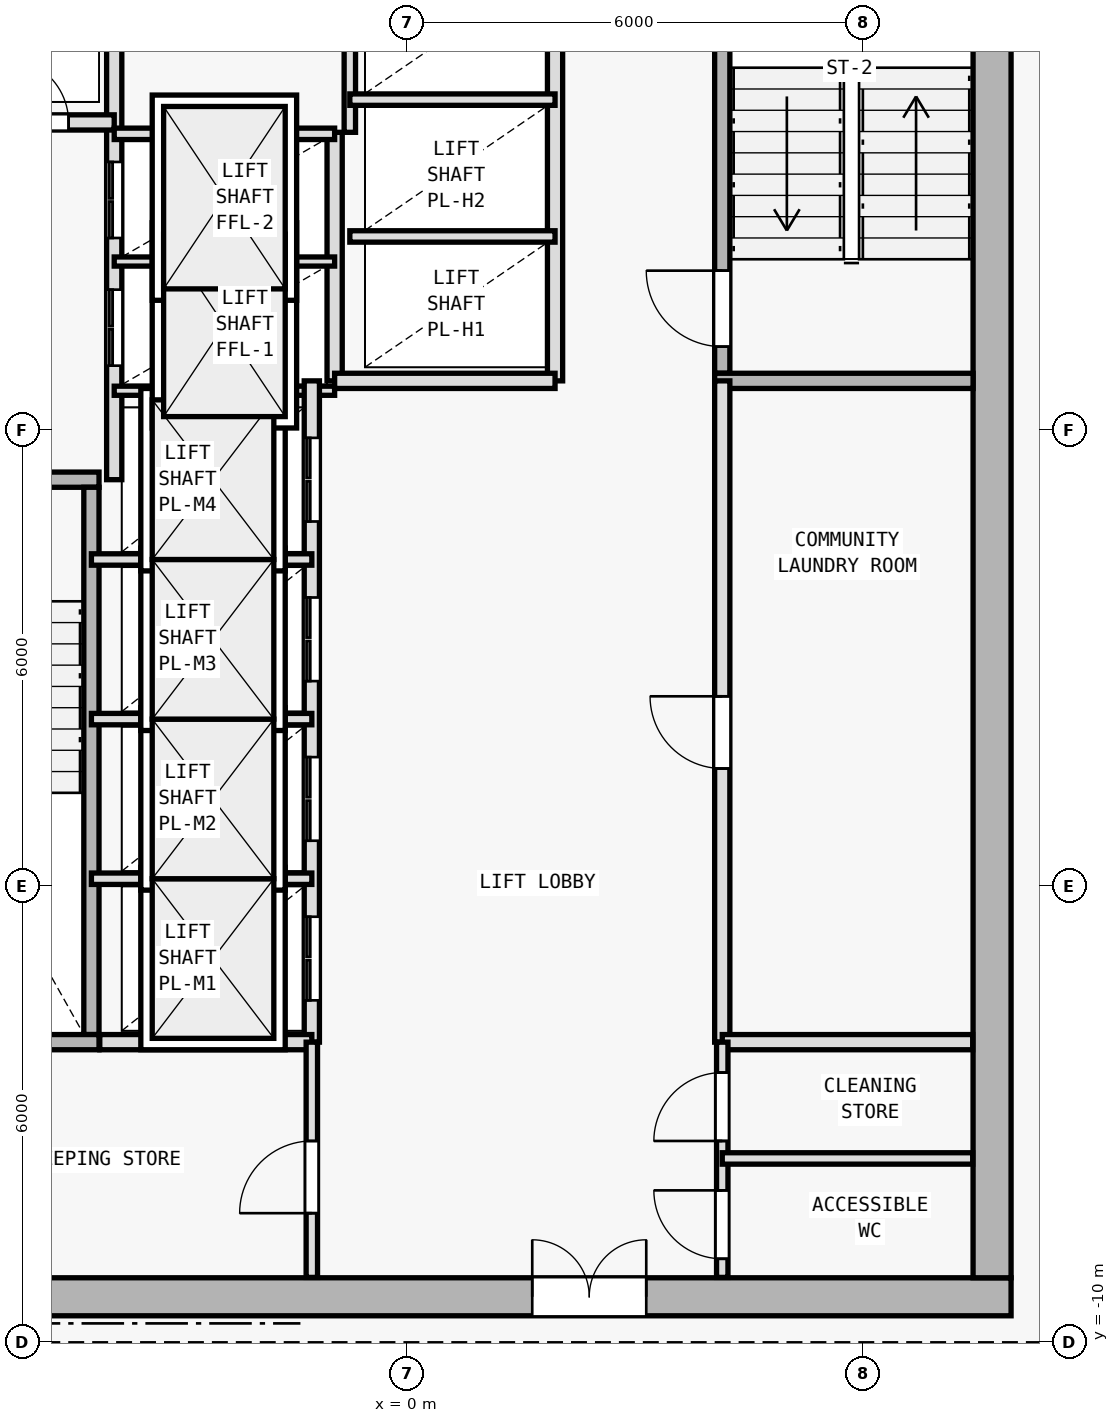
"""IFC4 building model, lengths in metres.
Left out: names, types, materials, properties, quantities, classifications, styles, units other than length and angle.
Written with IfcOpenShell. Run it as: python <this file> out.ifc"""

import sys

from ifc_helpers import new_model, si_unit, direction, frame, frame_2d, origin, origin_2d, place, context, subcontext, project, spatial, rectangle, i_section, extrude, element, fill, save


model = new_model("IFC4")
c1 = context("Model", 3, precision=1e-05, world=origin(), true_north=direction((0.0, 1.0)))
c2 = subcontext(c1, "Body", "Model", "MODEL_VIEW")
j1 = project(units=[si_unit("LENGTHUNIT", "METRE"), si_unit("PLANEANGLEUNIT", "RADIAN")], contexts=[c1])
p1 = place(None, origin())
s1 = spatial("IfcSite", under=j1, at=p1, CompositionType="ELEMENT")
p2 = place(p1, origin())
s2 = spatial("IfcBuilding", under=s1, at=p2, CompositionType="ELEMENT")
p3 = place(p2, frame((0.0, 0.0, 142.2)))
s3 = spatial("IfcBuildingStorey", under=s2, at=p3, CompositionType="ELEMENT", Elevation=142.2)
for number, where, z_axis, x_axis in (
    (1, (7.7, -9.4, 0.0), (0.0, 0.0, 1.0), (1.0, 0.0, 0.0)),
    (2, (0.0, -9.4, 0.0), (0.0, 0.0, 1.0), (1.0, 0.0, 0.0)),
    (3, (7.7, 0.4, 0.0), (0.0, 0.0, 1.0), (1.0, 0.0, 0.0)),
):
    element("IfcColumn", number, at=place(p3, frame(where, z_axis=z_axis, x_axis=x_axis)), inside=s3, PredefinedType="COLUMN", context=c2, shape_type="SweptSolid", body=[
        extrude(i_section(OverallWidth=0.404, OverallDepth=0.407, WebThickness=0.017, FlangeThickness=0.028, FilletRadius=0.015, at=origin_2d()), origin(), (0.0, 0.0, 1.0), 3.6),
    ])
p4 = place(p3, frame((-7.95, -9.4, 0.0), z_axis=(0.0, 0.0, 1.0), x_axis=(1.0, 0.0, 0.0)))
e4 = element("IfcWall", 4, at=p4, inside=s3, PredefinedType="SHEAR", context=c2, shape_type="SweptSolid", body=[
    extrude(rectangle(XDim=15.9, YDim=0.5, at=frame_2d((7.95, 0.0))), origin(), (0.0, 0.0, 1.0), 3.35),
])
p5 = place(p4, frame((9.6, 0.0, 0.0)))
e5 = element("IfcOpeningElement", 5, at=p5, cuts=e4, PredefinedType="OPENING", context=c2, shape_type="SweptSolid", body=[
    extrude(rectangle(XDim=1.5, YDim=2.2, at=frame_2d((0.75, 1.1))), frame((0.0, 0.26, 0.0), z_axis=(0.0, -1.0, 0.0), x_axis=(1.0, 0.0, 0.0)), (0.0, 0.0, 1.0), 0.52),
])
p6 = place(p3, frame((7.7, 9.95, 0.0), z_axis=(0.0, 0.0, 1.0), x_axis=(0.0, -1.0, 0.0)))
e6 = element("IfcWall", 6, at=p6, inside=s3, PredefinedType="SHEAR", context=c2, shape_type="SweptSolid", body=[
    extrude(rectangle(XDim=19.1, YDim=0.5, at=frame_2d((9.55, 0.0))), origin(), (0.0, 0.0, 1.0), 3.35),
])
p7 = place(p3, frame((-7.45, 1.35, 0.0), z_axis=(0.0, 0.0, 1.0), x_axis=(1.0, 0.0, 0.0)))
e7 = element("IfcWall", 7, at=p7, inside=s3, PredefinedType="SOLIDWALL", context=c2, shape_type="SweptSolid", body=[
    extrude(rectangle(XDim=3.4, YDim=0.2, at=frame_2d((1.7, 0.0))), origin(), (0.0, 0.0, 1.0), 3.35),
])
p8 = place(p7, frame((0.65, 0.0, 0.0)))
e8 = element("IfcOpeningElement", 8, at=p8, cuts=e7, PredefinedType="OPENING", context=c2, shape_type="SweptSolid", body=[
    extrude(rectangle(XDim=1.0, YDim=2.15, at=frame_2d((0.5, 1.075))), frame((0.0, 0.11, 0.0), z_axis=(0.0, -1.0, 0.0), x_axis=(1.0, 0.0, 0.0)), (0.0, 0.0, 1.0), 0.22),
])
p9 = place(p3, frame((-4.15, -5.95, 0.0), z_axis=(0.0, 0.0, 1.0), x_axis=(0.0, 1.0, 0.0)))
e9 = element("IfcWall", 9, at=p9, inside=s3, PredefinedType="SOLIDWALL", context=c2, shape_type="SweptSolid", body=[
    extrude(rectangle(XDim=7.2, YDim=0.2, at=frame_2d((3.6, 0.0))), origin(), (0.0, 0.0, 1.0), 3.35),
])
p10 = place(p3, frame((-3.85, 1.35, 0.0), z_axis=(0.0, 0.0, 1.0), x_axis=(0.0, 1.0, 0.0)))
e10 = element("IfcWall", 10, at=p10, inside=s3, PredefinedType="SOLIDWALL", context=c2, shape_type="SweptSolid", body=[
    extrude(rectangle(XDim=8.595, YDim=0.2, at=frame_2d((4.297, 0.0))), origin(), (0.0, 0.0, 1.0), 3.35),
])
p11 = place(p10, frame((1.5, 0.0, 0.0)))
e11 = element("IfcOpeningElement", 11, at=p11, cuts=e10, PredefinedType="OPENING", context=c2, shape_type="SweptSolid", body=[
    extrude(rectangle(XDim=1.0, YDim=2.15, at=frame_2d((0.5, 1.075))), frame((0.0, 0.11, 0.0), z_axis=(0.0, -1.0, 0.0), x_axis=(1.0, 0.0, 0.0)), (0.0, 0.0, 1.0), 0.22),
])
p12 = place(p10, frame((3.18, 0.0, 0.0)))
e12 = element("IfcOpeningElement", 12, at=p12, cuts=e10, PredefinedType="OPENING", context=c2, shape_type="SweptSolid", body=[
    extrude(rectangle(XDim=1.0, YDim=2.15, at=frame_2d((0.5, 1.075))), frame((0.0, 0.11, 0.0), z_axis=(0.0, -1.0, 0.0), x_axis=(1.0, 0.0, 0.0)), (0.0, 0.0, 1.0), 0.22),
])
p13 = place(p3, frame((-7.445, 6.05, 0.0), z_axis=(0.0, 0.0, 1.0), x_axis=(1.0, 0.0, 0.0)))
e13 = element("IfcWall", 13, at=p13, inside=s3, PredefinedType="SOLIDWALL", context=c2, shape_type="SweptSolid", body=[
    extrude(rectangle(XDim=3.595, YDim=0.2, at=frame_2d((1.797, 0.0))), origin(), (0.0, 0.0, 1.0), 3.35),
])
p14 = place(p13, frame((0.345, 0.0, 0.0)))
e14 = element("IfcOpeningElement", 14, at=p14, cuts=e13, PredefinedType="OPENING", context=c2, shape_type="SweptSolid", body=[
    extrude(rectangle(XDim=0.85, YDim=2.1, at=frame_2d((0.425, 1.05))), frame((0.0, 0.11, 0.0), z_axis=(0.0, -1.0, 0.0), x_axis=(1.0, 0.0, 0.0)), (0.0, 0.0, 1.0), 0.22),
])
p15 = place(p13, frame((2.145, 0.0, 0.0)))
e15 = element("IfcOpeningElement", 15, at=p15, cuts=e13, PredefinedType="OPENING", context=c2, shape_type="SweptSolid", body=[
    extrude(rectangle(XDim=0.85, YDim=2.1, at=frame_2d((0.425, 1.05))), frame((0.0, 0.11, 0.0), z_axis=(0.0, -1.0, 0.0), x_axis=(1.0, 0.0, 0.0)), (0.0, 0.0, 1.0), 0.22),
])
p16 = place(p3, frame((4.15, 2.75, 0.0), z_axis=(0.0, 0.0, 1.0), x_axis=(0.0, 1.0, 0.0)))
e16 = element("IfcWall", 16, at=p16, inside=s3, PredefinedType="SOLIDWALL", context=c2, shape_type="SweptSolid", body=[
    extrude(rectangle(XDim=7.2, YDim=0.2, at=frame_2d((3.6, 0.0))), origin(), (0.0, 0.0, 1.0), 3.35),
])
p17 = place(p16, frame((0.35, 0.0, 0.0)))
e17 = element("IfcOpeningElement", 17, at=p17, cuts=e16, PredefinedType="OPENING", context=c2, shape_type="SweptSolid", body=[
    extrude(rectangle(XDim=1.0, YDim=2.15, at=frame_2d((0.5, 1.075))), frame((0.0, 0.11, 0.0), z_axis=(0.0, -1.0, 0.0), x_axis=(1.0, 0.0, 0.0)), (0.0, 0.0, 1.0), 0.22),
])
p18 = place(p3, frame((4.05, 2.65, 0.0), z_axis=(0.0, 0.0, 1.0), x_axis=(1.0, 0.0, 0.0)))
e18 = element("IfcWall", 18, at=p18, inside=s3, PredefinedType="SOLIDWALL", context=c2, shape_type="SweptSolid", body=[
    extrude(rectangle(XDim=3.4, YDim=0.2, at=frame_2d((1.7, 0.0))), origin(), (0.0, 0.0, 1.0), 3.35),
])
p19 = place(p3, frame((-0.95, 2.65, 0.0), z_axis=(0.0, 0.0, 1.0), x_axis=(0.0, 1.0, 0.0)))
e19 = element("IfcWall", 19, at=p19, inside=s3, PredefinedType="SOLIDWALL", context=c2, shape_type="SweptSolid", body=[
    extrude(rectangle(XDim=3.27, YDim=0.2, at=frame_2d((1.635, 0.0))), origin(), (0.0, 0.0, 1.0), 3.35),
])
for number, where, z_axis, x_axis in (
    (20, (-3.85, 2.52, 0.0), (0.0, 0.0, 1.0), (1.0, 0.0, 0.0)),
    (21, (-3.85, 4.22, 0.0), (0.0, 0.0, 1.0), (1.0, 0.0, 0.0)),
):
    element("IfcWall", number, at=place(p3, frame(where, z_axis=z_axis, x_axis=x_axis)), inside=s3, PredefinedType="PARTITIONING", context=c2, shape_type="SweptSolid", body=[
        extrude(rectangle(XDim=2.9, YDim=0.12, at=frame_2d((1.45, 0.0))), origin(), (0.0, 0.0, 1.0), 3.35),
    ])
p20 = place(p3, frame((-3.85, 5.9, 0.0), z_axis=(0.0, 0.0, 1.0), x_axis=(1.0, 0.0, 0.0)))
e22 = element("IfcWall", 22, at=p20, inside=s3, PredefinedType="PARTITIONING", context=c2, shape_type="SweptSolid", body=[
    extrude(rectangle(XDim=2.9, YDim=0.15, at=frame_2d((1.45, 0.0))), origin(), (0.0, 0.0, 1.0), 3.35),
])
p21 = place(p3, frame((4.15, -6.05, 0.0), z_axis=(0.0, 0.0, 1.0), x_axis=(0.0, 1.0, 0.0)))
e23 = element("IfcWall", 23, at=p21, inside=s3, PredefinedType="SOLIDWALL", context=c2, shape_type="SweptSolid", body=[
    extrude(rectangle(XDim=8.7, YDim=0.2, at=frame_2d((4.35, 0.0))), origin(), (0.0, 0.0, 1.0), 3.35),
])
p22 = place(p21, frame((3.6, 0.0, 0.0)))
e24 = element("IfcOpeningElement", 24, at=p22, cuts=e23, PredefinedType="OPENING", context=c2, shape_type="SweptSolid", body=[
    extrude(rectangle(XDim=0.95, YDim=2.1, at=frame_2d((0.475, 1.05))), frame((0.0, 0.11, 0.0), z_axis=(0.0, -1.0, 0.0), x_axis=(1.0, 0.0, 0.0)), (0.0, 0.0, 1.0), 0.22),
])
p23 = place(p3, frame((-1.25, -6.05, 0.0), z_axis=(0.0, 0.0, 1.0), x_axis=(0.0, 1.0, 0.0)))
e25 = element("IfcWall", 25, at=p23, inside=s3, PredefinedType="SOLIDWALL", context=c2, shape_type="SweptSolid", body=[
    extrude(rectangle(XDim=8.7, YDim=0.2, at=frame_2d((4.35, 0.0))), origin(), (0.0, 0.0, 1.0), 3.35),
])
p24 = place(p23, frame((0.55, 0.0, 0.0)))
e26 = element("IfcOpeningElement", 26, at=p24, cuts=e25, PredefinedType="OPENING", context=c2, shape_type="SweptSolid", body=[
    extrude(rectangle(XDim=1.1, YDim=2.15, at=frame_2d((0.55, 1.075))), frame((0.0, 0.11, 0.0), z_axis=(0.0, -1.0, 0.0), x_axis=(1.0, 0.0, 0.0)), (0.0, 0.0, 1.0), 0.22),
])
p25 = place(p23, frame((2.65, 0.0, 0.0)))
e27 = element("IfcOpeningElement", 27, at=p25, cuts=e25, PredefinedType="OPENING", context=c2, shape_type="SweptSolid", body=[
    extrude(rectangle(XDim=1.1, YDim=2.15, at=frame_2d((0.55, 1.075))), frame((0.0, 0.11, 0.0), z_axis=(0.0, -1.0, 0.0), x_axis=(1.0, 0.0, 0.0)), (0.0, 0.0, 1.0), 0.22),
])
p26 = place(p23, frame((4.75, 0.0, 0.0)))
e28 = element("IfcOpeningElement", 28, at=p26, cuts=e25, PredefinedType="OPENING", context=c2, shape_type="SweptSolid", body=[
    extrude(rectangle(XDim=1.1, YDim=2.15, at=frame_2d((0.55, 1.075))), frame((0.0, 0.11, 0.0), z_axis=(0.0, -1.0, 0.0), x_axis=(1.0, 0.0, 0.0)), (0.0, 0.0, 1.0), 0.22),
])
p27 = place(p23, frame((6.85, 0.0, 0.0)))
e29 = element("IfcOpeningElement", 29, at=p27, cuts=e25, PredefinedType="OPENING", context=c2, shape_type="SweptSolid", body=[
    extrude(rectangle(XDim=1.1, YDim=2.15, at=frame_2d((0.55, 1.075))), frame((0.0, 0.11, 0.0), z_axis=(0.0, -1.0, 0.0), x_axis=(1.0, 0.0, 0.0)), (0.0, 0.0, 1.0), 0.22),
])
for number, where, z_axis, x_axis in (
    (30, (-4.15, -3.9, 0.0), (0.0, 0.0, 1.0), (1.0, 0.0, 0.0)),
    (31, (-4.15, -1.8, 0.0), (0.0, 0.0, 1.0), (1.0, 0.0, 0.0)),
    (32, (-4.15, 0.3, 0.0), (0.0, 0.0, 1.0), (1.0, 0.0, 0.0)),
):
    element("IfcWall", number, at=place(p3, frame(where, z_axis=z_axis, x_axis=x_axis)), inside=s3, PredefinedType="PARTITIONING", context=c2, shape_type="SweptSolid", body=[
        extrude(rectangle(XDim=2.9, YDim=0.15, at=frame_2d((1.45, 0.0))), origin(), (0.0, 0.0, 1.0), 3.35),
    ])
p28 = place(p3, frame((1.95, 2.65, 0.0), z_axis=(0.0, 0.0, 1.0), x_axis=(0.0, 1.0, 0.0)))
e33 = element("IfcWall", 33, at=p28, inside=s3, PredefinedType="SOLIDWALL", context=c2, shape_type="SweptSolid", body=[
    extrude(rectangle(XDim=7.295, YDim=0.2, at=frame_2d((3.647, 0.0))), origin(), (0.0, 0.0, 1.0), 3.35),
])
p29 = place(p3, frame((-0.95, 2.65, 0.0), z_axis=(0.0, 0.0, 1.0), x_axis=(1.0, 0.0, 0.0)))
e34 = element("IfcWall", 34, at=p29, inside=s3, PredefinedType="SOLIDWALL", context=c2, shape_type="SweptSolid", body=[
    extrude(rectangle(XDim=2.9, YDim=0.2, at=frame_2d((1.45, 0.0))), origin(), (0.0, 0.0, 1.0), 3.35),
])
p30 = place(p3, frame((-0.75, 5.92, 0.0), z_axis=(0.0, 0.0, 1.0), x_axis=(0.0, 1.0, 0.0)))
e35 = element("IfcWall", 35, at=p30, inside=s3, PredefinedType="PARTITIONING", context=c2, shape_type="SweptSolid", body=[
    extrude(rectangle(XDim=4.025, YDim=0.15, at=frame_2d((2.013, 0.0))), origin(), (0.0, 0.0, 1.0), 3.35),
])
for number, where, z_axis, x_axis in (
    (36, (-0.75, 4.55, 0.0), (0.0, 0.0, 1.0), (1.0, 0.0, 0.0)),
    (37, (-0.75, 6.35, 0.0), (0.0, 0.0, 1.0), (1.0, 0.0, 0.0)),
):
    element("IfcWall", number, at=place(p3, frame(where, z_axis=z_axis, x_axis=x_axis)), inside=s3, PredefinedType="PARTITIONING", context=c2, shape_type="SweptSolid", body=[
        extrude(rectangle(XDim=2.7, YDim=0.15, at=frame_2d((1.35, 0.0))), origin(), (0.0, 0.0, 1.0), 3.35),
    ])
p31 = place(p3, frame((-7.45, -6.05, 0.0), z_axis=(0.0, 0.0, 1.0), x_axis=(1.0, 0.0, 0.0)))
e38 = element("IfcWall", 38, at=p31, inside=s3, PredefinedType="SOLIDWALL", context=c2, shape_type="SweptSolid", body=[
    extrude(rectangle(XDim=3.4, YDim=0.2, at=frame_2d((1.7, 0.0))), origin(), (0.0, 0.0, 1.0), 3.35),
])
p32 = place(p3, frame((-4.04, -6.05, 0.0), z_axis=(0.0, 0.0, 1.0), x_axis=(1.0, 0.0, 0.0)))
e39 = element("IfcWall", 39, at=p32, inside=s3, PredefinedType="SOLIDWALL", context=c2, shape_type="SweptSolid", body=[
    extrude(rectangle(XDim=2.79, YDim=0.2, at=frame_2d((1.395, 0.0))), origin(), (0.0, 0.0, 1.0), 3.35),
])
p33 = place(p3, frame((4.15, -6.05, 0.0), z_axis=(0.0, 0.0, 1.0), x_axis=(1.0, 0.0, 0.0)))
e40 = element("IfcWall", 40, at=p33, inside=s3, PredefinedType="SOLIDWALL", context=c2, shape_type="SweptSolid", body=[
    extrude(rectangle(XDim=3.295, YDim=0.2, at=frame_2d((1.647, 0.0))), origin(), (0.0, 0.0, 1.0), 3.35),
])
p34 = place(p3, frame((-1.25, -9.145, 0.0), z_axis=(0.0, 0.0, 1.0), x_axis=(0.0, 1.0, 0.0)))
e41 = element("IfcWall", 41, at=p34, inside=s3, PredefinedType="PARTITIONING", context=c2, shape_type="SweptSolid", body=[
    extrude(rectangle(XDim=3.095, YDim=0.15, at=frame_2d((1.547, 0.0))), origin(), (0.0, 0.0, 1.0), 3.35),
])
p35 = place(p34, frame((0.845, 0.0, 0.0)))
e42 = element("IfcOpeningElement", 42, at=p35, cuts=e41, PredefinedType="OPENING", context=c2, shape_type="SweptSolid", body=[
    extrude(rectangle(XDim=0.95, YDim=2.1, at=frame_2d((0.475, 1.05))), frame((0.0, 0.085, 0.0), z_axis=(0.0, -1.0, 0.0), x_axis=(1.0, 0.0, 0.0)), (0.0, 0.0, 1.0), 0.17),
])
p36 = place(p3, frame((4.15, -9.145, 0.0), z_axis=(0.0, 0.0, 1.0), x_axis=(0.0, 1.0, 0.0)))
e43 = element("IfcWall", 43, at=p36, inside=s3, PredefinedType="PARTITIONING", context=c2, shape_type="SweptSolid", body=[
    extrude(rectangle(XDim=3.095, YDim=0.15, at=frame_2d((1.547, 0.0))), origin(), (0.0, 0.0, 1.0), 3.35),
])
p37 = place(p36, frame((0.245, 0.0, 0.0)))
e44 = element("IfcOpeningElement", 44, at=p37, cuts=e43, PredefinedType="OPENING", context=c2, shape_type="SweptSolid", body=[
    extrude(rectangle(XDim=0.9, YDim=2.1, at=frame_2d((0.45, 1.05))), frame((0.0, 0.085, 0.0), z_axis=(0.0, -1.0, 0.0), x_axis=(1.0, 0.0, 0.0)), (0.0, 0.0, 1.0), 0.17),
])
p38 = place(p36, frame((1.795, 0.0, 0.0)))
e45 = element("IfcOpeningElement", 45, at=p38, cuts=e43, PredefinedType="OPENING", context=c2, shape_type="SweptSolid", body=[
    extrude(rectangle(XDim=0.9, YDim=2.1, at=frame_2d((0.45, 1.05))), frame((0.0, 0.085, 0.0), z_axis=(0.0, -1.0, 0.0), x_axis=(1.0, 0.0, 0.0)), (0.0, 0.0, 1.0), 0.17),
])
p39 = place(p3, frame((4.15, -7.58, 0.0), z_axis=(0.0, 0.0, 1.0), x_axis=(1.0, 0.0, 0.0)))
e46 = element("IfcWall", 46, at=p39, inside=s3, PredefinedType="PARTITIONING", context=c2, shape_type="SweptSolid", body=[
    extrude(rectangle(XDim=3.295, YDim=0.15, at=frame_2d((1.647, 0.0))), origin(), (0.0, 0.0, 1.0), 3.35),
])
p40 = place(p5, origin())
e47 = element("IfcDoor", 47, at=p40, inside=s3, OperationType="DOUBLE_DOOR_SINGLE_SWING", PredefinedType="DOOR", context=c2, shape_type="SweptSolid", body=[
    extrude(rectangle(XDim=1.5, YDim=2.2, at=frame_2d((0.75, 1.1))), frame((0.0, 0.025, 0.0), z_axis=(0.0, -1.0, 0.0), x_axis=(1.0, 0.0, 0.0)), (0.0, 0.0, 1.0), 0.05),
])
fill(e5, e47)
p41 = place(p15, origin())
e48 = element("IfcDoor", 48, at=p41, inside=s3, OperationType="SINGLE_SWING_LEFT", PredefinedType="DOOR", context=c2, shape_type="SweptSolid", body=[
    extrude(rectangle(XDim=0.85, YDim=2.1, at=frame_2d((0.425, 1.05))), frame((0.0, 0.025, 0.0), z_axis=(0.0, -1.0, 0.0), x_axis=(1.0, 0.0, 0.0)), (0.0, 0.0, 1.0), 0.05),
])
fill(e15, e48)
p42 = place(p17, origin())
e49 = element("IfcDoor", 49, at=p42, inside=s3, OperationType="SINGLE_SWING_RIGHT", PredefinedType="DOOR", context=c2, shape_type="SweptSolid", body=[
    extrude(rectangle(XDim=1.0, YDim=2.15, at=frame_2d((0.5, 1.075))), frame((0.0, 0.025, 0.0), z_axis=(0.0, -1.0, 0.0), x_axis=(1.0, 0.0, 0.0)), (0.0, 0.0, 1.0), 0.05),
])
fill(e17, e49)
p43 = place(p22, origin())
e50 = element("IfcDoor", 50, at=p43, inside=s3, OperationType="SINGLE_SWING_RIGHT", PredefinedType="DOOR", context=c2, shape_type="SweptSolid", body=[
    extrude(rectangle(XDim=0.95, YDim=2.1, at=frame_2d((0.475, 1.05))), frame((0.0, 0.025, 0.0), z_axis=(0.0, -1.0, 0.0), x_axis=(1.0, 0.0, 0.0)), (0.0, 0.0, 1.0), 0.05),
])
fill(e24, e50)
p44 = place(p24, origin())
e51 = element("IfcDoor", 51, at=p44, inside=s3, OperationType="DOUBLE_DOOR_SLIDING", PredefinedType="DOOR", context=c2, shape_type="SweptSolid", body=[
    extrude(rectangle(XDim=1.1, YDim=2.15, at=frame_2d((0.55, 1.075))), frame((0.0, 0.025, 0.0), z_axis=(0.0, -1.0, 0.0), x_axis=(1.0, 0.0, 0.0)), (0.0, 0.0, 1.0), 0.05),
])
fill(e26, e51)
p45 = place(p25, origin())
e52 = element("IfcDoor", 52, at=p45, inside=s3, OperationType="DOUBLE_DOOR_SLIDING", PredefinedType="DOOR", context=c2, shape_type="SweptSolid", body=[
    extrude(rectangle(XDim=1.1, YDim=2.15, at=frame_2d((0.55, 1.075))), frame((0.0, 0.025, 0.0), z_axis=(0.0, -1.0, 0.0), x_axis=(1.0, 0.0, 0.0)), (0.0, 0.0, 1.0), 0.05),
])
fill(e27, e52)
p46 = place(p26, origin())
e53 = element("IfcDoor", 53, at=p46, inside=s3, OperationType="DOUBLE_DOOR_SLIDING", PredefinedType="DOOR", context=c2, shape_type="SweptSolid", body=[
    extrude(rectangle(XDim=1.1, YDim=2.15, at=frame_2d((0.55, 1.075))), frame((0.0, 0.025, 0.0), z_axis=(0.0, -1.0, 0.0), x_axis=(1.0, 0.0, 0.0)), (0.0, 0.0, 1.0), 0.05),
])
fill(e28, e53)
p47 = place(p27, origin())
e54 = element("IfcDoor", 54, at=p47, inside=s3, OperationType="DOUBLE_DOOR_SLIDING", PredefinedType="DOOR", context=c2, shape_type="SweptSolid", body=[
    extrude(rectangle(XDim=1.1, YDim=2.15, at=frame_2d((0.55, 1.075))), frame((0.0, 0.025, 0.0), z_axis=(0.0, -1.0, 0.0), x_axis=(1.0, 0.0, 0.0)), (0.0, 0.0, 1.0), 0.05),
])
fill(e29, e54)
p48 = place(p11, origin())
e55 = element("IfcDoor", 55, at=p48, inside=s3, OperationType="DOUBLE_DOOR_SLIDING", PredefinedType="DOOR", context=c2, shape_type="SweptSolid", body=[
    extrude(rectangle(XDim=1.0, YDim=2.15, at=frame_2d((0.5, 1.075))), frame((0.0, 0.025, 0.0), z_axis=(0.0, -1.0, 0.0), x_axis=(1.0, 0.0, 0.0)), (0.0, 0.0, 1.0), 0.05),
])
fill(e11, e55)
p49 = place(p12, origin())
e56 = element("IfcDoor", 56, at=p49, inside=s3, OperationType="DOUBLE_DOOR_SLIDING", PredefinedType="DOOR", context=c2, shape_type="SweptSolid", body=[
    extrude(rectangle(XDim=1.0, YDim=2.15, at=frame_2d((0.5, 1.075))), frame((0.0, 0.025, 0.0), z_axis=(0.0, -1.0, 0.0), x_axis=(1.0, 0.0, 0.0)), (0.0, 0.0, 1.0), 0.05),
])
fill(e12, e56)
p50 = place(p35, origin())
e57 = element("IfcDoor", 57, at=p50, inside=s3, OperationType="SINGLE_SWING_LEFT", PredefinedType="DOOR", context=c2, shape_type="SweptSolid", body=[
    extrude(rectangle(XDim=0.95, YDim=2.1, at=frame_2d((0.475, 1.05))), frame((0.0, 0.025, 0.0), z_axis=(0.0, -1.0, 0.0), x_axis=(1.0, 0.0, 0.0)), (0.0, 0.0, 1.0), 0.05),
])
fill(e42, e57)
p51 = place(p37, origin())
e58 = element("IfcDoor", 58, at=p51, inside=s3, OperationType="SINGLE_SWING_RIGHT", PredefinedType="DOOR", context=c2, shape_type="SweptSolid", body=[
    extrude(rectangle(XDim=0.9, YDim=2.1, at=frame_2d((0.45, 1.05))), frame((0.0, 0.025, 0.0), z_axis=(0.0, -1.0, 0.0), x_axis=(1.0, 0.0, 0.0)), (0.0, 0.0, 1.0), 0.05),
])
fill(e44, e58)
p52 = place(p38, origin())
e59 = element("IfcDoor", 59, at=p52, inside=s3, OperationType="SINGLE_SWING_LEFT", PredefinedType="DOOR", context=c2, shape_type="SweptSolid", body=[
    extrude(rectangle(XDim=0.9, YDim=2.1, at=frame_2d((0.45, 1.05))), frame((0.0, 0.025, 0.0), z_axis=(0.0, -1.0, 0.0), x_axis=(1.0, 0.0, 0.0)), (0.0, 0.0, 1.0), 0.05),
])
fill(e45, e59)
save(model, sys.argv[1])
